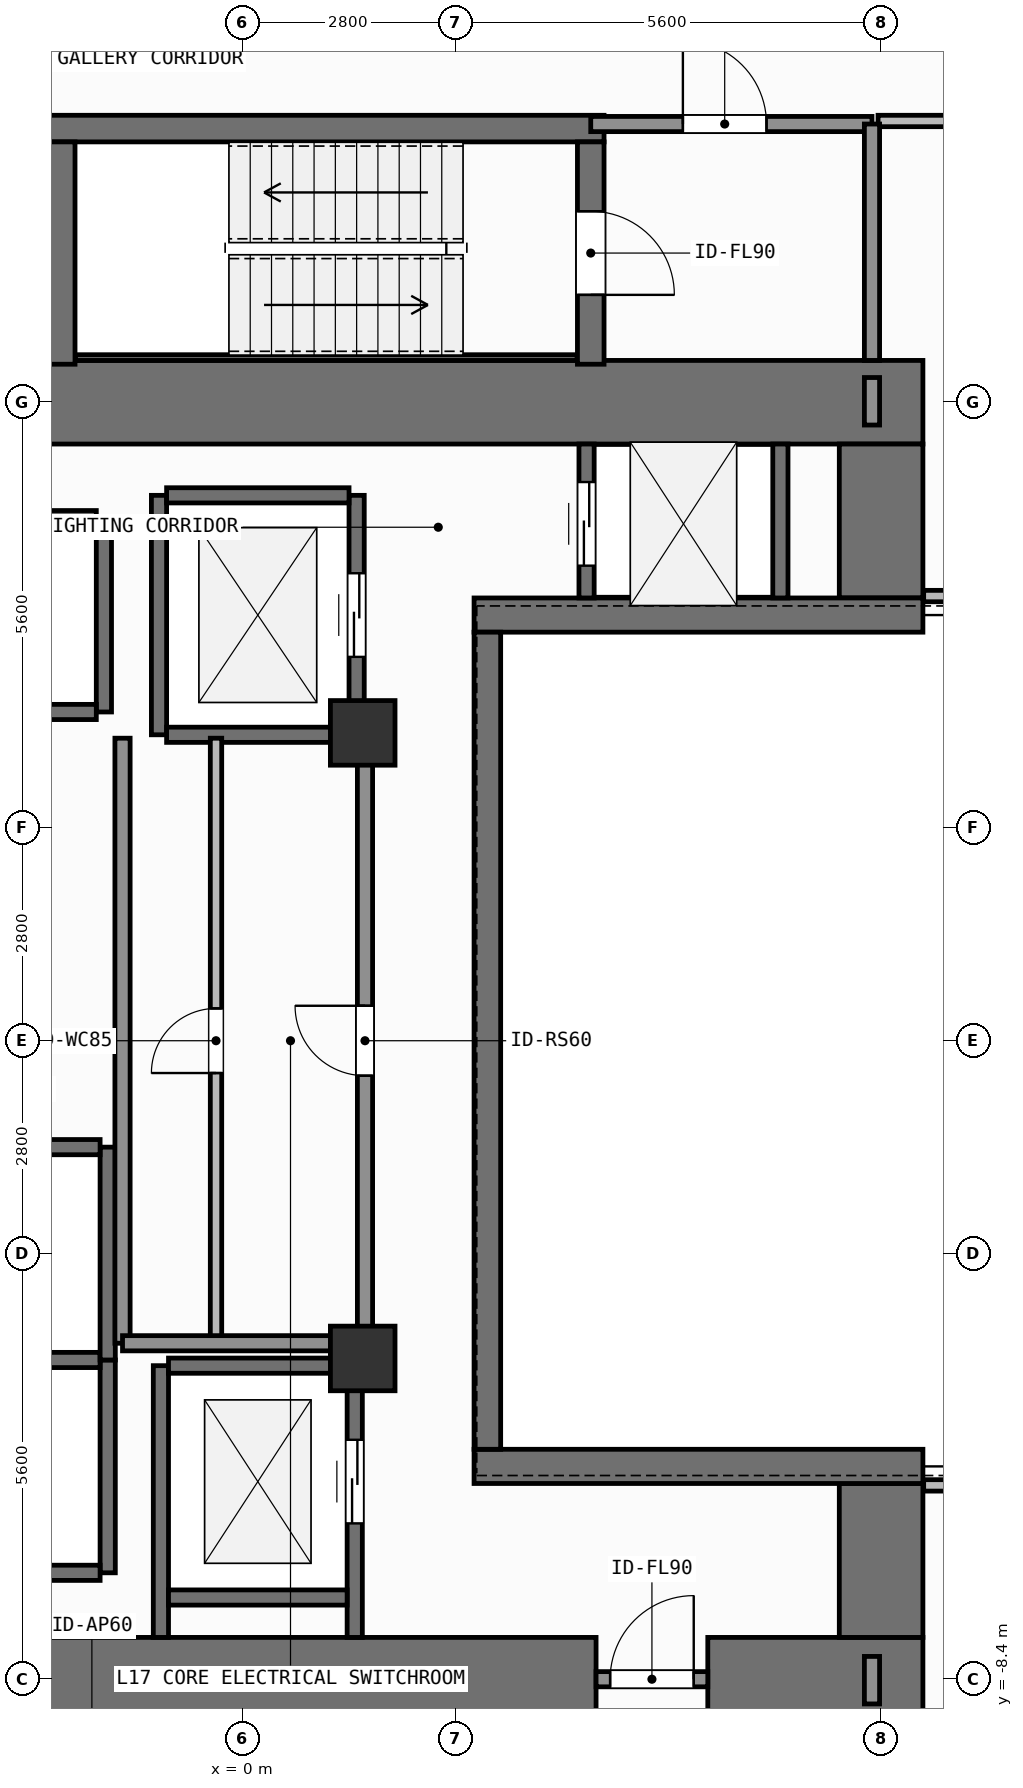
"""IFC4 building model, lengths in metres.
Left out: names, types, materials, properties, quantities, classifications, styles, units other than length and angle.
Written with IfcOpenShell. Run it as: python <this file> out.ifc"""

import sys

from ifc_helpers import new_model, si_unit, direction, frame, frame_2d, origin, origin_2d, place, context, subcontext, project, spatial, rectangle, extrude, element, fill, save


model = new_model("IFC4")
c1 = context("Model", 3, precision=1e-05, world=origin(), true_north=direction((0.0, 1.0)))
c2 = subcontext(c1, "Body", "Model", "MODEL_VIEW")
j1 = project(units=[si_unit("LENGTHUNIT", "METRE"), si_unit("PLANEANGLEUNIT", "RADIAN")], contexts=[c1])
p1 = place(None, origin())
s1 = spatial("IfcSite", under=j1, at=p1, CompositionType="ELEMENT")
p2 = place(p1, origin())
s2 = spatial("IfcBuilding", under=s1, at=p2, CompositionType="ELEMENT")
p3 = place(p2, frame((0.0, 0.0, 65.7)))
s3 = spatial("IfcBuildingStorey", under=s2, at=p3, CompositionType="ELEMENT", Elevation=65.7)
p4 = place(p3, frame((-2.62, -8.4, 0.0), z_axis=(0.0, 0.0, 1.0), x_axis=(1.0, 0.0, 0.0)))
e1 = element("IfcWall", 1, at=p4, inside=s3, PredefinedType="SHEAR", context=c2, shape_type="SweptSolid", body=[
    extrude(rectangle(XDim=7.27, YDim=1.1, at=frame_2d((3.635, 0.0))), origin(), (0.0, 0.0, 1.0), 3.9),
])
p5 = place(p3, frame((6.12, -8.4, 0.0), z_axis=(0.0, 0.0, 1.0), x_axis=(1.0, 0.0, 0.0)))
e2 = element("IfcWall", 2, at=p5, inside=s3, PredefinedType="SHEAR", context=c2, shape_type="SweptSolid", body=[
    extrude(rectangle(XDim=2.83, YDim=1.1, at=frame_2d((1.415, 0.0))), origin(), (0.0, 0.0, 1.0), 3.9),
])
p6 = place(p3, frame((-7.55, 8.4, 0.0), z_axis=(0.0, 0.0, 1.0), x_axis=(1.0, 0.0, 0.0)))
e3 = element("IfcWall", 3, at=p6, inside=s3, PredefinedType="SHEAR", context=c2, shape_type="SweptSolid", body=[
    extrude(rectangle(XDim=16.5, YDim=1.1, at=frame_2d((8.25, 0.0))), origin(), (0.0, 0.0, 1.0), 3.9),
])
for number, where, z_axis, x_axis in (
    (4, (8.4, -7.85, 0.0), (0.0, 0.0, 1.0), (0.0, 1.0, 0.0)),
    (5, (8.4, 5.825, 0.0), (0.0, 0.0, 1.0), (0.0, 1.0, 0.0)),
):
    element("IfcWall", number, at=place(p3, frame(where, z_axis=z_axis, x_axis=x_axis)), inside=s3, PredefinedType="SHEAR", context=c2, shape_type="SweptSolid", body=[
        extrude(rectangle(XDim=2.025, YDim=1.1, at=frame_2d((1.013, 0.0))), origin(), (0.0, 0.0, 1.0), 3.9),
    ])
for number, where, z_axis, x_axis in (
    (6, (3.045, -5.6, 0.0), (0.0, 0.0, 1.0), (1.0, 0.0, 0.0)),
    (7, (3.045, 5.6, 0.0), (0.0, 0.0, 1.0), (1.0, 0.0, 0.0)),
):
    element("IfcWall", number, at=place(p3, frame(where, z_axis=z_axis, x_axis=x_axis)), inside=s3, PredefinedType="SHEAR", context=c2, shape_type="SweptSolid", body=[
        extrude(rectangle(XDim=5.905, YDim=0.45, at=frame_2d((2.953, 0.0))), origin(), (0.0, 0.0, 1.0), 3.9),
    ])
p7 = place(p3, frame((3.22, -5.375, 0.0), z_axis=(0.0, 0.0, 1.0), x_axis=(0.0, 1.0, 0.0)))
e8 = element("IfcWall", 8, at=p7, inside=s3, PredefinedType="SHEAR", context=c2, shape_type="SweptSolid", body=[
    extrude(rectangle(XDim=10.75, YDim=0.35, at=frame_2d((5.375, 0.0))), origin(), (0.0, 0.0, 1.0), 3.9),
])
p8 = place(p3, frame((-2.555, 12.0, 0.0), z_axis=(0.0, 0.0, 1.0), x_axis=(1.0, 0.0, 0.0)))
e9 = element("IfcWall", 9, at=p8, inside=s3, PredefinedType="SHEAR", context=c2, shape_type="SweptSolid", body=[
    extrude(rectangle(XDim=7.31, YDim=0.35, at=frame_2d((3.655, 0.0))), origin(), (0.0, 0.0, 1.0), 3.9),
])
p9 = place(p3, frame((-2.2, 8.988, 0.0), z_axis=(0.0, 0.0, 1.0), x_axis=(1.0, 0.0, 0.0)))
e10 = element("IfcWall", 10, at=p9, inside=s3, PredefinedType="SHEAR", context=c2, shape_type="SweptSolid", body=[
    extrude(rectangle(XDim=6.6, YDim=0.075, at=frame_2d((3.3, 0.0))), origin(), (0.0, 0.0, 1.0), 3.9),
])
p10 = place(p3, frame((-2.38, 8.9, 0.0), z_axis=(0.0, 0.0, 1.0), x_axis=(0.0, 1.0, 0.0)))
e11 = element("IfcWall", 11, at=p10, inside=s3, PredefinedType="SHEAR", context=c2, shape_type="SweptSolid", body=[
    extrude(rectangle(XDim=2.925, YDim=0.35, at=frame_2d((1.462, 0.0))), origin(), (0.0, 0.0, 1.0), 3.9),
])
p11 = place(p3, frame((4.58, 11.825, 0.0), z_axis=(0.0, 0.0, 1.0), x_axis=(0.0, -1.0, 0.0)))
e12 = element("IfcWall", 12, at=p11, inside=s3, PredefinedType="SHEAR", context=c2, shape_type="SweptSolid", body=[
    extrude(rectangle(XDim=2.925, YDim=0.35, at=frame_2d((1.462, 0.0))), origin(), (0.0, 0.0, 1.0), 3.9),
])
p12 = place(p11, frame((0.913, 0.0, 0.0)))
e13 = element("IfcOpeningElement", 13, at=p12, cuts=e12, PredefinedType="OPENING", context=c2, shape_type="SweptSolid", body=[
    extrude(rectangle(XDim=1.1, YDim=2.15, at=frame_2d((0.55, 1.075))), frame((0.0, 0.185, 0.0), z_axis=(0.0, -1.0, 0.0), x_axis=(1.0, 0.0, 0.0)), (0.0, 0.0, 1.0), 0.37),
])
for number, where, z_axis, x_axis in (
    (14, (1.58, -4.18, 0.0), (0.0, 0.0, 1.0), (1.0, 0.0, 0.0)),
    (15, (1.58, 4.05, 0.0), (0.0, 0.0, 1.0), (1.0, 0.0, 0.0)),
):
    element("IfcColumn", number, at=place(p3, frame(where, z_axis=z_axis, x_axis=x_axis)), inside=s3, PredefinedType="COLUMN", context=c2, shape_type="SweptSolid", body=[
        extrude(rectangle(XDim=0.85, YDim=0.85, at=origin_2d()), origin(), (0.0, 0.0, 1.0), 3.9),
    ])
p13 = place(p3, frame((-1.825, 4.325, 0.0), z_axis=(0.0, 0.0, 1.0), x_axis=(0.0, 1.0, 0.0)))
e16 = element("IfcWall", 16, at=p13, inside=s3, PredefinedType="SHEAR", context=c2, shape_type="SweptSolid", body=[
    extrude(rectangle(XDim=2.55, YDim=0.2, at=frame_2d((1.275, 0.0))), origin(), (0.0, 0.0, 1.0), 3.68),
])
for number, where, z_axis, x_axis in (
    (17, (-4.275, 4.325, 0.0), (0.0, 0.0, 1.0), (1.0, 0.0, 0.0)),
    (18, (-4.275, 6.875, 0.0), (0.0, 0.0, 1.0), (1.0, 0.0, 0.0)),
):
    element("IfcWall", number, at=place(p3, frame(where, z_axis=z_axis, x_axis=x_axis)), inside=s3, PredefinedType="SHEAR", context=c2, shape_type="SweptSolid", body=[
        extrude(rectangle(XDim=2.35, YDim=0.2, at=frame_2d((1.175, 0.0))), origin(), (0.0, 0.0, 1.0), 3.68),
    ])
p14 = place(p3, frame((-1.775, -7.0, 0.0), z_axis=(0.0, 0.0, 1.0), x_axis=(0.0, 1.0, 0.0)))
e19 = element("IfcWall", 19, at=p14, inside=s3, PredefinedType="SHEAR", context=c2, shape_type="SweptSolid", body=[
    extrude(rectangle(XDim=2.8, YDim=0.2, at=frame_2d((1.4, 0.0))), origin(), (0.0, 0.0, 1.0), 3.68),
])
for number, where, z_axis, x_axis in (
    (20, (-4.325, -7.0, 0.0), (0.0, 0.0, 1.0), (1.0, 0.0, 0.0)),
    (21, (-4.325, -4.2, 0.0), (0.0, 0.0, 1.0), (1.0, 0.0, 0.0)),
):
    element("IfcWall", number, at=place(p3, frame(where, z_axis=z_axis, x_axis=x_axis)), inside=s3, PredefinedType="SHEAR", context=c2, shape_type="SweptSolid", body=[
        extrude(rectangle(XDim=2.45, YDim=0.2, at=frame_2d((1.225, 0.0))), origin(), (0.0, 0.0, 1.0), 3.68),
    ])
p15 = place(p3, frame((-1.775, -4.2, 0.0), z_axis=(0.0, 0.0, 1.0), x_axis=(0.0, 1.0, 0.0)))
e22 = element("IfcWall", 22, at=p15, inside=s3, PredefinedType="SHEAR", context=c2, shape_type="SweptSolid", body=[
    extrude(rectangle(XDim=2.8, YDim=0.2, at=frame_2d((1.4, 0.0))), origin(), (0.0, 0.0, 1.0), 3.68),
])
p16 = place(p3, frame((-4.325, -1.4, 0.0), z_axis=(0.0, 0.0, 1.0), x_axis=(1.0, 0.0, 0.0)))
e23 = element("IfcWall", 23, at=p16, inside=s3, PredefinedType="SHEAR", context=c2, shape_type="SweptSolid", body=[
    extrude(rectangle(XDim=2.45, YDim=0.2, at=frame_2d((1.225, 0.0))), origin(), (0.0, 0.0, 1.0), 3.68),
])
p17 = place(p3, frame((-1.1, 4.025, 0.0), z_axis=(0.0, 0.0, 1.0), x_axis=(0.0, 1.0, 0.0)))
e24 = element("IfcWall", 24, at=p17, inside=s3, PredefinedType="SHEAR", context=c2, shape_type="SweptSolid", body=[
    extrude(rectangle(XDim=3.15, YDim=0.2, at=frame_2d((1.575, 0.0))), origin(), (0.0, 0.0, 1.0), 3.68),
])
p18 = place(p3, frame((1.5, 4.025, 0.0), z_axis=(0.0, 0.0, 1.0), x_axis=(0.0, 1.0, 0.0)))
e25 = element("IfcWall", 25, at=p18, inside=s3, PredefinedType="SHEAR", context=c2, shape_type="SweptSolid", body=[
    extrude(rectangle(XDim=3.15, YDim=0.2, at=frame_2d((1.575, 0.0))), origin(), (0.0, 0.0, 1.0), 3.68),
])
p19 = place(p18, frame((1.025, 0.0, 0.0)))
e26 = element("IfcOpeningElement", 26, at=p19, cuts=e25, PredefinedType="OPENING", context=c2, shape_type="SweptSolid", body=[
    extrude(rectangle(XDim=1.1, YDim=2.2, at=frame_2d((0.55, 1.1))), frame((0.0, 0.11, 0.0), z_axis=(0.0, -1.0, 0.0), x_axis=(1.0, 0.0, 0.0)), (0.0, 0.0, 1.0), 0.22),
])
for number, where, z_axis, x_axis in (
    (27, (-1.0, 4.025, 0.0), (0.0, 0.0, 1.0), (1.0, 0.0, 0.0)),
    (28, (-1.0, 7.175, 0.0), (0.0, 0.0, 1.0), (1.0, 0.0, 0.0)),
):
    element("IfcWall", number, at=place(p3, frame(where, z_axis=z_axis, x_axis=x_axis)), inside=s3, PredefinedType="SHEAR", context=c2, shape_type="SweptSolid", body=[
        extrude(rectangle(XDim=2.4, YDim=0.2, at=frame_2d((1.2, 0.0))), origin(), (0.0, 0.0, 1.0), 3.68),
    ])
p20 = place(p3, frame((-1.075, -7.85, 0.0), z_axis=(0.0, 0.0, 1.0), x_axis=(0.0, 1.0, 0.0)))
e29 = element("IfcWall", 29, at=p20, inside=s3, PredefinedType="SHEAR", context=c2, shape_type="SweptSolid", body=[
    extrude(rectangle(XDim=3.575, YDim=0.2, at=frame_2d((1.788, 0.0))), origin(), (0.0, 0.0, 1.0), 3.68),
])
p21 = place(p3, frame((1.475, -7.85, 0.0), z_axis=(0.0, 0.0, 1.0), x_axis=(0.0, 1.0, 0.0)))
e30 = element("IfcWall", 30, at=p21, inside=s3, PredefinedType="SHEAR", context=c2, shape_type="SweptSolid", body=[
    extrude(rectangle(XDim=3.575, YDim=0.2, at=frame_2d((1.788, 0.0))), origin(), (0.0, 0.0, 1.0), 3.68),
])
p22 = place(p21, frame((1.5, 0.0, 0.0)))
e31 = element("IfcOpeningElement", 31, at=p22, cuts=e30, PredefinedType="OPENING", context=c2, shape_type="SweptSolid", body=[
    extrude(rectangle(XDim=1.1, YDim=2.2, at=frame_2d((0.55, 1.1))), frame((0.0, 0.11, 0.0), z_axis=(0.0, -1.0, 0.0), x_axis=(1.0, 0.0, 0.0)), (0.0, 0.0, 1.0), 0.22),
])
for number, where, z_axis, x_axis in (
    (32, (-0.975, -7.325, 0.0), (0.0, 0.0, 1.0), (1.0, 0.0, 0.0)),
    (33, (-0.975, -4.275, 0.0), (0.0, 0.0, 1.0), (1.0, 0.0, 0.0)),
):
    element("IfcWall", number, at=place(p3, frame(where, z_axis=z_axis, x_axis=x_axis)), inside=s3, PredefinedType="SHEAR", context=c2, shape_type="SweptSolid", body=[
        extrude(rectangle(XDim=2.35, YDim=0.2, at=frame_2d((1.175, 0.0))), origin(), (0.0, 0.0, 1.0), 3.68),
    ])
p23 = place(p3, frame((4.525, 5.825, 0.0), z_axis=(0.0, 0.0, 1.0), x_axis=(0.0, 1.0, 0.0)))
e34 = element("IfcWall", 34, at=p23, inside=s3, PredefinedType="SHEAR", context=c2, shape_type="SweptSolid", body=[
    extrude(rectangle(XDim=2.025, YDim=0.2, at=frame_2d((1.013, 0.0))), origin(), (0.0, 0.0, 1.0), 3.68),
])
p24 = place(p23, frame((0.425, 0.0, 0.0)))
e35 = element("IfcOpeningElement", 35, at=p24, cuts=e34, PredefinedType="OPENING", context=c2, shape_type="SweptSolid", body=[
    extrude(rectangle(XDim=1.1, YDim=2.2, at=frame_2d((0.55, 1.1))), frame((0.0, 0.11, 0.0), z_axis=(0.0, -1.0, 0.0), x_axis=(1.0, 0.0, 0.0)), (0.0, 0.0, 1.0), 0.22),
])
p25 = place(p3, frame((7.075, 5.825, 0.0), z_axis=(0.0, 0.0, 1.0), x_axis=(0.0, 1.0, 0.0)))
e36 = element("IfcWall", 36, at=p25, inside=s3, PredefinedType="SHEAR", context=c2, shape_type="SweptSolid", body=[
    extrude(rectangle(XDim=2.025, YDim=0.2, at=frame_2d((1.013, 0.0))), origin(), (0.0, 0.0, 1.0), 3.68),
])
p26 = place(p3, frame((4.65, -8.4, 0.0), z_axis=(0.0, 0.0, 1.0), x_axis=(1.0, 0.0, 0.0)))
e37 = element("IfcWall", 37, at=p26, inside=s3, PredefinedType="SOLIDWALL", context=c2, shape_type="SweptSolid", body=[
    extrude(rectangle(XDim=1.47, YDim=0.2, at=frame_2d((0.735, 0.0))), origin(), (0.0, 0.0, 1.0), 2.72),
])
p27 = place(p26, frame((0.185, 0.0, 0.0)))
e38 = element("IfcOpeningElement", 38, at=p27, cuts=e37, PredefinedType="OPENING", context=c2, shape_type="SweptSolid", body=[
    extrude(rectangle(XDim=1.1, YDim=2.15, at=frame_2d((0.55, 1.075))), frame((0.0, 0.11, 0.0), z_axis=(0.0, -1.0, 0.0), x_axis=(1.0, 0.0, 0.0)), (0.0, 0.0, 1.0), 0.22),
])
p28 = place(p3, frame((4.58, 12.06, 0.0), z_axis=(0.0, 0.0, 1.0), x_axis=(1.0, 0.0, 0.0)))
e39 = element("IfcWall", 39, at=p28, inside=s3, PredefinedType="SOLIDWALL", context=c2, shape_type="SweptSolid", body=[
    extrude(rectangle(XDim=3.7, YDim=0.2, at=frame_2d((1.85, 0.0))), origin(), (0.0, 0.0, 1.0), 3.68),
])
p29 = place(p28, frame((1.212, 0.0, 0.0)))
e40 = element("IfcOpeningElement", 40, at=p29, cuts=e39, PredefinedType="OPENING", context=c2, shape_type="SweptSolid", body=[
    extrude(rectangle(XDim=1.1, YDim=2.15, at=frame_2d((0.55, 1.075))), frame((0.0, 0.11, 0.0), z_axis=(0.0, -1.0, 0.0), x_axis=(1.0, 0.0, 0.0)), (0.0, 0.0, 1.0), 0.22),
])
p30 = place(p3, frame((-0.35, -3.98, 0.0), z_axis=(0.0, 0.0, 1.0), x_axis=(0.0, 1.0, 0.0)))
e41 = element("IfcWall", 41, at=p30, inside=s3, PredefinedType="PARTITIONING", context=c2, shape_type="SweptSolid", body=[
    extrude(rectangle(XDim=7.96, YDim=0.15, at=frame_2d((3.98, 0.0))), origin(), (0.0, 0.0, 1.0), 3.68),
])
p31 = place(p30, frame((3.555, 0.0, 0.0)))
e42 = element("IfcOpeningElement", 42, at=p31, cuts=e41, PredefinedType="OPENING", context=c2, shape_type="SweptSolid", body=[
    extrude(rectangle(XDim=0.85, YDim=2.1, at=frame_2d((0.425, 1.05))), frame((0.0, 0.085, 0.0), z_axis=(0.0, -1.0, 0.0), x_axis=(1.0, 0.0, 0.0)), (0.0, 0.0, 1.0), 0.17),
])
p32 = place(p3, frame((1.61, -3.98, 0.0), z_axis=(0.0, 0.0, 1.0), x_axis=(0.0, 1.0, 0.0)))
e43 = element("IfcWall", 43, at=p32, inside=s3, PredefinedType="SOLIDWALL", context=c2, shape_type="SweptSolid", body=[
    extrude(rectangle(XDim=7.96, YDim=0.2, at=frame_2d((3.98, 0.0))), origin(), (0.0, 0.0, 1.0), 3.68),
])
p33 = place(p32, frame((3.52, 0.0, 0.0)))
e44 = element("IfcOpeningElement", 44, at=p33, cuts=e43, PredefinedType="OPENING", context=c2, shape_type="SweptSolid", body=[
    extrude(rectangle(XDim=0.92, YDim=2.1, at=frame_2d((0.46, 1.05))), frame((0.0, 0.11, 0.0), z_axis=(0.0, -1.0, 0.0), x_axis=(1.0, 0.0, 0.0)), (0.0, 0.0, 1.0), 0.22),
])
p34 = place(p3, frame((8.36, 12.1, 0.0), z_axis=(0.0, 0.0, 1.0), x_axis=(1.0, 0.0, 0.0)))
e45 = element("IfcWall", 45, at=p34, inside=s3, PredefinedType="PARTITIONING", context=c2, shape_type="SweptSolid", body=[
    extrude(rectangle(XDim=7.22, YDim=0.15, at=frame_2d((3.61, 0.0))), origin(), (0.0, 0.0, 1.0), 3.68),
])
p35 = place(p34, frame((3.513, 0.0, 0.0)))
e46 = element("IfcOpeningElement", 46, at=p35, cuts=e45, PredefinedType="OPENING", context=c2, shape_type="SweptSolid", body=[
    extrude(rectangle(XDim=0.9, YDim=2.1, at=frame_2d((0.45, 1.05))), frame((0.0, 0.085, 0.0), z_axis=(0.0, -1.0, 0.0), x_axis=(1.0, 0.0, 0.0)), (0.0, 0.0, 1.0), 0.17),
])
p36 = place(p3, frame((8.28, 8.95, 0.0), z_axis=(0.0, 0.0, 1.0), x_axis=(0.0, 1.0, 0.0)))
e47 = element("IfcWall", 47, at=p36, inside=s3, PredefinedType="SOLIDWALL", context=c2, shape_type="SweptSolid", body=[
    extrude(rectangle(XDim=3.11, YDim=0.2, at=frame_2d((1.555, 0.0))), origin(), (0.0, 0.0, 1.0), 3.68),
])
p37 = place(p3, frame((-1.58, -3.98, 0.0), z_axis=(0.0, 0.0, 1.0), x_axis=(0.0, 1.0, 0.0)))
e48 = element("IfcWall", 48, at=p37, inside=s3, PredefinedType="SOLIDWALL", context=c2, shape_type="SweptSolid", body=[
    extrude(rectangle(XDim=7.96, YDim=0.2, at=frame_2d((3.98, 0.0))), origin(), (0.0, 0.0, 1.0), 3.68),
])
p38 = place(p3, frame((-1.58, -3.98, 0.0), z_axis=(0.0, 0.0, 1.0), x_axis=(1.0, 0.0, 0.0)))
e49 = element("IfcWall", 49, at=p38, inside=s3, PredefinedType="SOLIDWALL", context=c2, shape_type="SweptSolid", body=[
    extrude(rectangle(XDim=3.19, YDim=0.2, at=frame_2d((1.595, 0.0))), origin(), (0.0, 0.0, 1.0), 3.68),
])
p39 = place(p3, frame((8.28, -8.725, 0.0), z_axis=(0.0, 0.0, 1.0), x_axis=(0.0, 1.0, 0.0)))
e50 = element("IfcWall", 50, at=p39, inside=s3, PredefinedType="SOLIDWALL", context=c2, shape_type="SweptSolid", body=[
    extrude(rectangle(XDim=0.625, YDim=0.2, at=frame_2d((0.312, 0.0))), origin(), (0.0, 0.0, 1.0), 3.68),
])
p40 = place(p3, frame((8.96, -5.85, 0.0), z_axis=(0.0, 0.0, 1.0), x_axis=(1.0, 0.0, 0.0)))
e51 = element("IfcWall", 51, at=p40, inside=s3, PredefinedType="PARTITIONING", context=c2, shape_type="SweptSolid", body=[
    extrude(rectangle(XDim=6.62, YDim=0.15, at=frame_2d((3.31, 0.0))), origin(), (0.0, 0.0, 1.0), 3.68),
])
p41 = place(p3, frame((8.28, 8.1, 0.0), z_axis=(0.0, 0.0, 1.0), x_axis=(0.0, 1.0, 0.0)))
e52 = element("IfcWall", 52, at=p41, inside=s3, PredefinedType="SOLIDWALL", context=c2, shape_type="SweptSolid", body=[
    extrude(rectangle(XDim=0.625, YDim=0.2, at=frame_2d((0.312, 0.0))), origin(), (0.0, 0.0, 1.0), 3.68),
])
p42 = place(p3, frame((8.96, 5.85, 0.0), z_axis=(0.0, 0.0, 1.0), x_axis=(1.0, 0.0, 0.0)))
e53 = element("IfcWall", 53, at=p42, inside=s3, PredefinedType="PARTITIONING", context=c2, shape_type="SweptSolid", body=[
    extrude(rectangle(XDim=6.62, YDim=0.15, at=frame_2d((3.31, 0.0))), origin(), (0.0, 0.0, 1.0), 3.68),
])
p43 = place(p19, origin())
e54 = element("IfcDoor", 54, at=p43, inside=s3, OperationType="SLIDING_TO_LEFT", PredefinedType="DOOR", context=c2, shape_type="SweptSolid", body=[
    extrude(rectangle(XDim=1.1, YDim=2.2, at=frame_2d((0.55, 1.1))), frame((0.0, 0.025, 0.0), z_axis=(0.0, -1.0, 0.0), x_axis=(1.0, 0.0, 0.0)), (0.0, 0.0, 1.0), 0.05),
])
fill(e26, e54)
p44 = place(p22, origin())
e55 = element("IfcDoor", 55, at=p44, inside=s3, OperationType="SLIDING_TO_LEFT", PredefinedType="DOOR", context=c2, shape_type="SweptSolid", body=[
    extrude(rectangle(XDim=1.1, YDim=2.2, at=frame_2d((0.55, 1.1))), frame((0.0, 0.025, 0.0), z_axis=(0.0, -1.0, 0.0), x_axis=(1.0, 0.0, 0.0)), (0.0, 0.0, 1.0), 0.05),
])
fill(e31, e55)
p45 = place(p24, origin())
e56 = element("IfcDoor", 56, at=p45, inside=s3, OperationType="SLIDING_TO_LEFT", PredefinedType="DOOR", context=c2, shape_type="SweptSolid", body=[
    extrude(rectangle(XDim=1.1, YDim=2.2, at=frame_2d((0.55, 1.1))), frame((0.0, 0.025, 0.0), z_axis=(0.0, -1.0, 0.0), x_axis=(1.0, 0.0, 0.0)), (0.0, 0.0, 1.0), 0.05),
])
fill(e35, e56)
p46 = place(p12, origin())
e57 = element("IfcDoor", 57, at=p46, inside=s3, OperationType="SINGLE_SWING_RIGHT", PredefinedType="DOOR", context=c2, shape_type="SweptSolid", body=[
    extrude(rectangle(XDim=1.1, YDim=2.15, at=frame_2d((0.55, 1.075))), frame((0.0, 0.025, 0.0), z_axis=(0.0, -1.0, 0.0), x_axis=(1.0, 0.0, 0.0)), (0.0, 0.0, 1.0), 0.05),
])
fill(e13, e57)
p47 = place(p27, origin())
e58 = element("IfcDoor", 58, at=p47, inside=s3, OperationType="SINGLE_SWING_RIGHT", PredefinedType="DOOR", context=c2, shape_type="SweptSolid", body=[
    extrude(rectangle(XDim=1.1, YDim=2.15, at=frame_2d((0.55, 1.075))), frame((0.0, 0.025, 0.0), z_axis=(0.0, -1.0, 0.0), x_axis=(1.0, 0.0, 0.0)), (0.0, 0.0, 1.0), 0.05),
])
fill(e38, e58)
p48 = place(p29, origin())
e59 = element("IfcDoor", 59, at=p48, inside=s3, OperationType="SINGLE_SWING_LEFT", PredefinedType="DOOR", context=c2, shape_type="SweptSolid", body=[
    extrude(rectangle(XDim=1.1, YDim=2.15, at=frame_2d((0.55, 1.075))), frame((0.0, 0.025, 0.0), z_axis=(0.0, -1.0, 0.0), x_axis=(1.0, 0.0, 0.0)), (0.0, 0.0, 1.0), 0.05),
])
fill(e40, e59)
p49 = place(p31, origin())
e60 = element("IfcDoor", 60, at=p49, inside=s3, OperationType="SINGLE_SWING_LEFT", PredefinedType="DOOR", context=c2, shape_type="SweptSolid", body=[
    extrude(rectangle(XDim=0.85, YDim=2.1, at=frame_2d((0.425, 1.05))), frame((0.0, 0.025, 0.0), z_axis=(0.0, -1.0, 0.0), x_axis=(1.0, 0.0, 0.0)), (0.0, 0.0, 1.0), 0.05),
])
fill(e42, e60)
p50 = place(p33, origin())
e61 = element("IfcDoor", 61, at=p50, inside=s3, OperationType="SINGLE_SWING_RIGHT", PredefinedType="DOOR", context=c2, shape_type="SweptSolid", body=[
    extrude(rectangle(XDim=0.92, YDim=2.1, at=frame_2d((0.46, 1.05))), frame((0.0, 0.025, 0.0), z_axis=(0.0, -1.0, 0.0), x_axis=(1.0, 0.0, 0.0)), (0.0, 0.0, 1.0), 0.05),
])
fill(e44, e61)
save(model, sys.argv[1])
